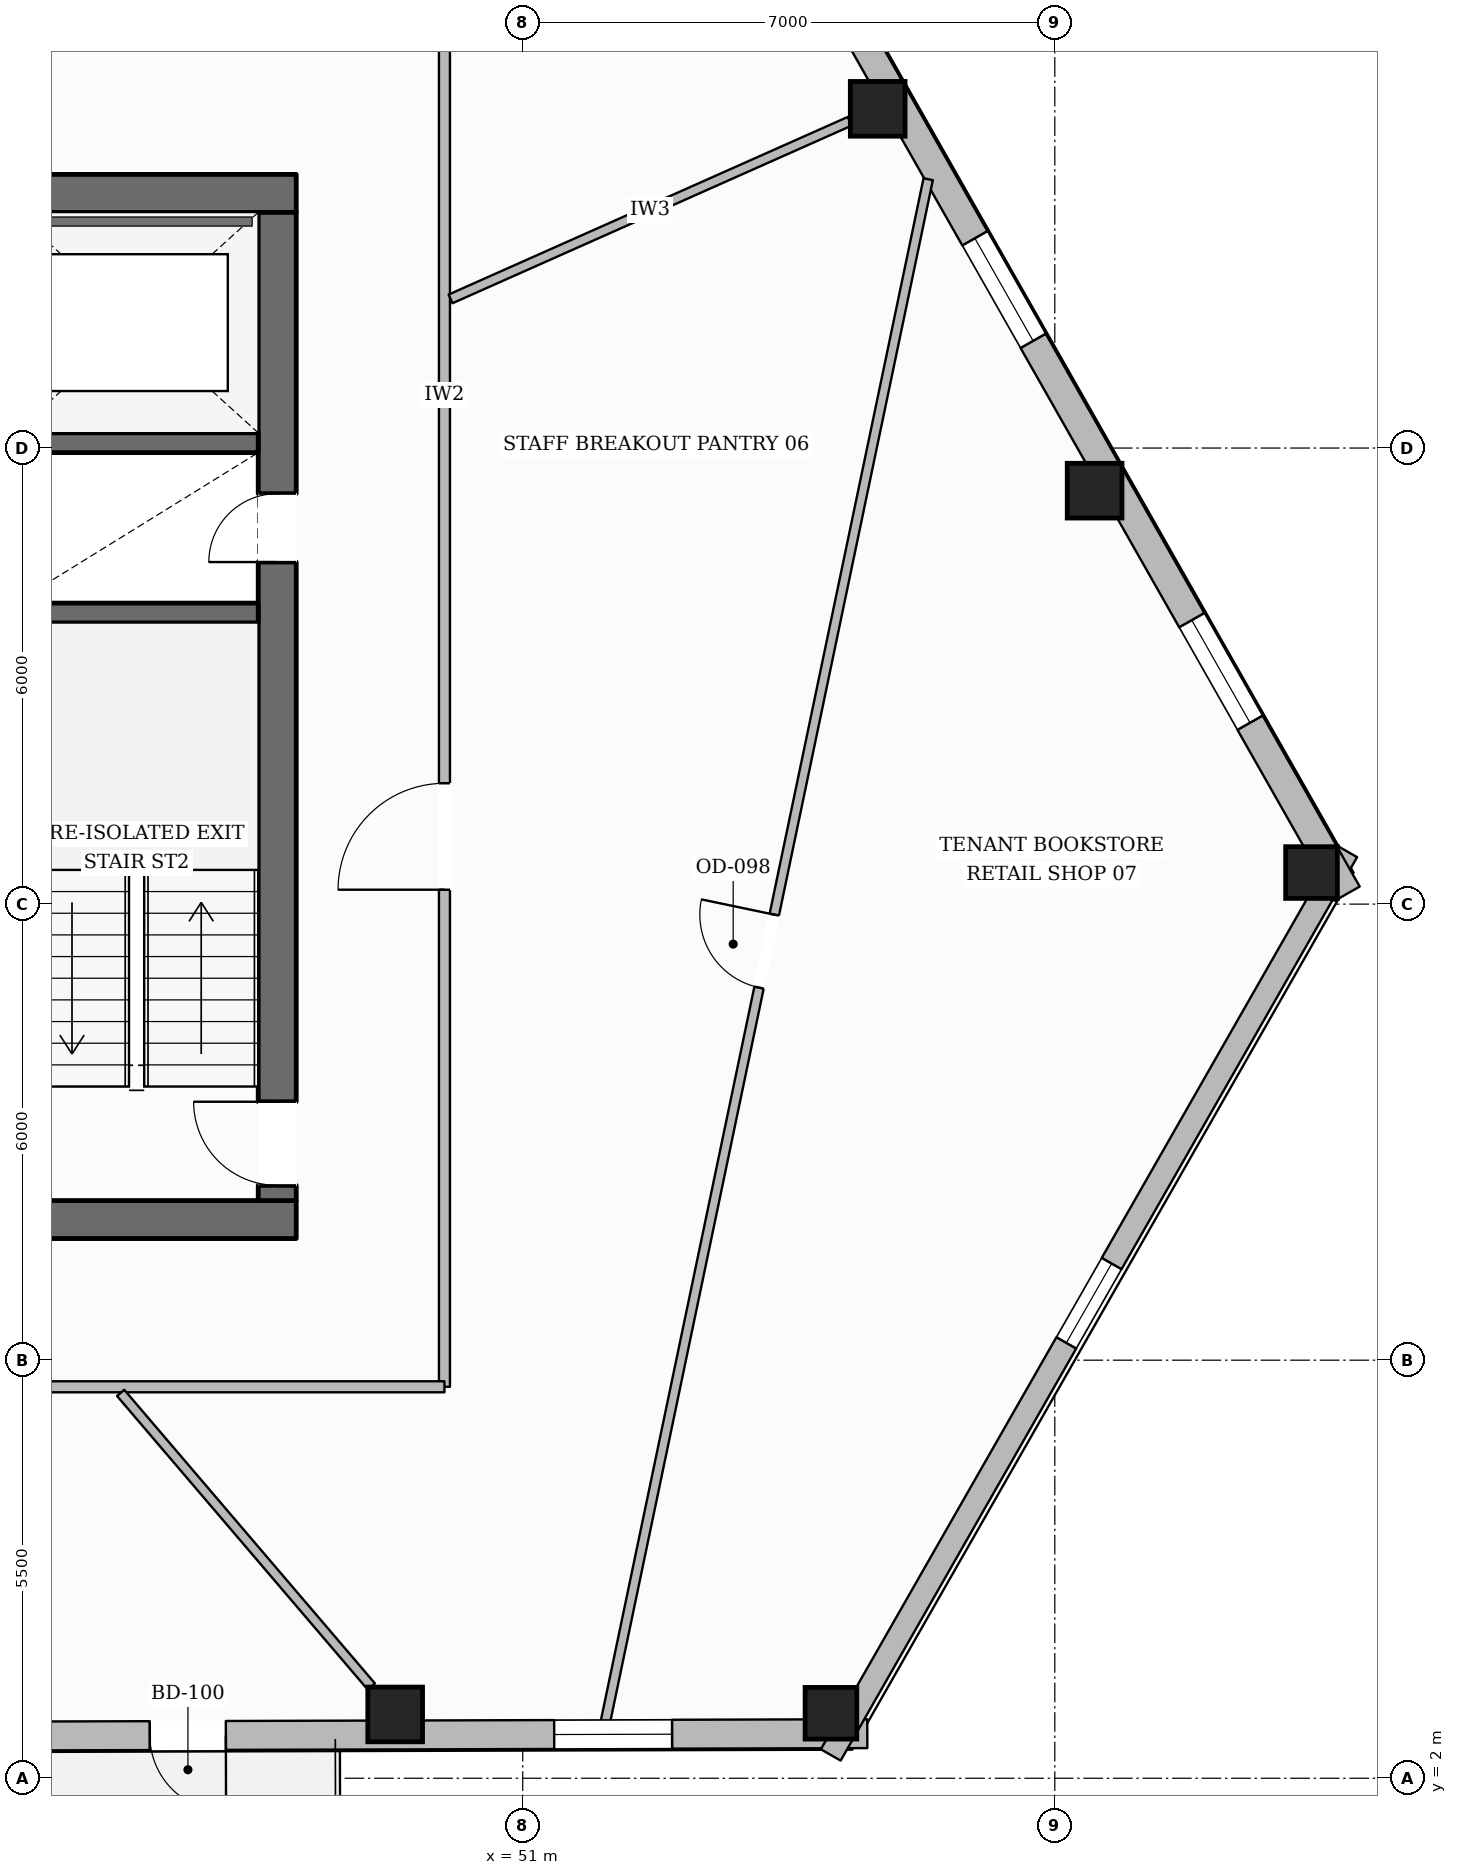
"""IFC4 building model, lengths in metres.
Left out: names, types, materials, properties, quantities, classifications, styles, units other than length and angle.
Written with IfcOpenShell. Run it as: python <this file> out.ifc"""

import sys

from ifc_helpers import new_model, si_unit, direction, frame, frame_2d, origin, origin_2d, place, context, subcontext, project, spatial, rectangle, hollow_rectangle, extrude, element, fill, save


model = new_model("IFC4")
c1 = context("Model", 3, precision=1e-05, world=origin(), true_north=direction((0.0, 1.0)))
c2 = subcontext(c1, "Body", "Model", "MODEL_VIEW")
j1 = project(units=[si_unit("LENGTHUNIT", "METRE"), si_unit("PLANEANGLEUNIT", "RADIAN")], contexts=[c1])
p1 = place(None, origin())
s1 = spatial("IfcSite", under=j1, at=p1, CompositionType="ELEMENT")
p2 = place(p1, origin())
s2 = spatial("IfcBuilding", under=s1, at=p2, CompositionType="ELEMENT")
p3 = place(p2, frame((0.0, 0.0, 89.35)))
s3 = spatial("IfcBuildingStorey", under=s2, at=p3, CompositionType="ELEMENT", Elevation=89.35)
p4 = place(p3, frame((27.98, 9.35, 0.0), z_axis=(0.0, 0.0, 1.0), x_axis=(1.0, 0.0, 0.0)))
e1 = element("IfcWall", 1, at=p4, inside=s3, PredefinedType="SOLIDWALL", context=c2, shape_type="SweptSolid", body=[
    extrude(rectangle(XDim=20.04, YDim=0.5, at=frame_2d((10.02, 0.0))), origin(), (0.0, 0.0, 1.0), 3.6),
])
p5 = place(p4, frame((10.52, 0.0, 0.0)))
e2 = element("IfcOpeningElement", 2, at=p5, cuts=e1, PredefinedType="OPENING", context=c2, shape_type="SweptSolid", body=[
    extrude(rectangle(XDim=1.4, YDim=2.2, at=frame_2d((0.7, 1.1))), frame((0.0, 0.26, 0.0), z_axis=(0.0, -1.0, 0.0), x_axis=(1.0, 0.0, 0.0)), (0.0, 0.0, 1.0), 0.52),
])
p6 = place(p3, frame((27.98, 22.85, 0.0), z_axis=(0.0, 0.0, 1.0), x_axis=(1.0, 0.0, 0.0)))
e3 = element("IfcWall", 3, at=p6, inside=s3, PredefinedType="SOLIDWALL", context=c2, shape_type="SweptSolid", body=[
    extrude(rectangle(XDim=20.04, YDim=0.5, at=frame_2d((10.02, 0.0))), origin(), (0.0, 0.0, 1.0), 3.6),
])
p7 = place(p6, frame((6.295, 0.0, 0.0)))
e4 = element("IfcOpeningElement", 4, at=p7, cuts=e3, PredefinedType="OPENING", context=c2, shape_type="SweptSolid", body=[
    extrude(rectangle(XDim=1.05, YDim=2.15, at=frame_2d((0.525, 1.075))), frame((0.0, 0.26, 0.0), z_axis=(0.0, -1.0, 0.0), x_axis=(1.0, 0.0, 0.0)), (0.0, 0.0, 1.0), 0.52),
])
p8 = place(p6, frame((12.695, 0.0, 0.0)))
e5 = element("IfcOpeningElement", 5, at=p8, cuts=e3, PredefinedType="OPENING", context=c2, shape_type="SweptSolid", body=[
    extrude(rectangle(XDim=1.05, YDim=2.15, at=frame_2d((0.525, 1.075))), frame((0.0, 0.26, 0.0), z_axis=(0.0, -1.0, 0.0), x_axis=(1.0, 0.0, 0.0)), (0.0, 0.0, 1.0), 0.52),
])
p9 = place(p3, frame((47.77, 9.6, 0.0), z_axis=(0.0, 0.0, 1.0), x_axis=(0.0, 1.0, 0.0)))
e6 = element("IfcWall", 6, at=p9, inside=s3, PredefinedType="SOLIDWALL", context=c2, shape_type="SweptSolid", body=[
    extrude(rectangle(XDim=13.0, YDim=0.5, at=frame_2d((6.5, 0.0))), origin(), (0.0, 0.0, 1.0), 3.6),
])
p10 = place(p9, frame((0.2, 0.0, 0.0)))
e7 = element("IfcOpeningElement", 7, at=p10, cuts=e6, PredefinedType="OPENING", context=c2, shape_type="SweptSolid", body=[
    extrude(rectangle(XDim=1.1, YDim=2.15, at=frame_2d((0.55, 1.075))), frame((0.0, 0.26, 0.0), z_axis=(0.0, -1.0, 0.0), x_axis=(1.0, 0.0, 0.0)), (0.0, 0.0, 1.0), 0.52),
])
p11 = place(p9, frame((8.4, 0.0, 0.0)))
e8 = element("IfcOpeningElement", 8, at=p11, cuts=e6, PredefinedType="OPENING", context=c2, shape_type="SweptSolid", body=[
    extrude(rectangle(XDim=0.9, YDim=2.1, at=frame_2d((0.45, 1.05))), frame((0.0, 0.26, 0.0), z_axis=(0.0, -1.0, 0.0), x_axis=(1.0, 0.0, 0.0)), (0.0, 0.0, 1.0), 0.52),
])
for number, where, z_axis, x_axis in (
    (9, (44.32, 17.33, 0.0), (0.0, 0.0, 1.0), (1.0, 0.0, 0.0)),
    (10, (44.32, 19.57, 0.0), (0.0, 0.0, 1.0), (1.0, 0.0, 0.0)),
):
    element("IfcWall", number, at=place(p3, frame(where, z_axis=z_axis, x_axis=x_axis)), inside=s3, PredefinedType="SHEAR", context=c2, shape_type="SweptSolid", body=[
        extrude(rectangle(XDim=3.2, YDim=0.26, at=frame_2d((1.6, 0.0))), origin(), (0.0, 0.0, 1.0), 3.6),
    ])
p12 = place(p3, frame((49.322, 2.839, 0.0), z_axis=(0.0, 0.0, 1.0), x_axis=(1.0, 0.0, 0.0)))
e11 = element("IfcColumn", 11, at=p12, inside=s3, PredefinedType="COLUMN", context=c2, shape_type="SweptSolid", body=[
    extrude(hollow_rectangle(XDim=0.72, YDim=0.72, WallThickness=0.032, at=origin_2d()), origin(), (0.0, 0.0, 1.0), 3.6),
])
for number, where, z_axis, x_axis in (
    (12, (55.055, 2.855, 0.0), (0.0, 0.0, 1.0), (1.0, 0.0, 0.0)),
    (13, (61.377, 13.915, 0.0), (0.0, 0.0, 1.0), (1.0, 0.0, 0.0)),
):
    element("IfcColumn", number, at=place(p3, frame(where, z_axis=z_axis, x_axis=x_axis)), inside=s3, PredefinedType="COLUMN", context=c2, shape_type="SweptSolid", body=[
        extrude(hollow_rectangle(XDim=0.68, YDim=0.68, WallThickness=0.03, at=origin_2d()), origin(), (0.0, 0.0, 1.0), 3.6),
    ])
for number, where, z_axis, x_axis in (
    (14, (58.524, 18.939, 0.0), (0.0, 0.0, 1.0), (1.0, 0.0, 0.0)),
    (15, (55.67, 23.963, 0.0), (0.0, 0.0, 1.0), (1.0, 0.0, 0.0)),
):
    element("IfcColumn", number, at=place(p3, frame(where, z_axis=z_axis, x_axis=x_axis)), inside=s3, PredefinedType="COLUMN", context=c2, shape_type="SweptSolid", body=[
        extrude(hollow_rectangle(XDim=0.72, YDim=0.72, WallThickness=0.032, at=origin_2d()), origin(), (0.0, 0.0, 1.0), 3.6),
    ])
p13 = place(p3, frame((55.533, 2.586, 0.0), z_axis=(0.0, 0.0, 1.0), x_axis=(-0.999996299189, -0.002720589845, 0.0)))
e16 = element("IfcWall", 16, at=p13, inside=s3, PredefinedType="STANDARD", context=c2, shape_type="SweptSolid", body=[
    extrude(rectangle(XDim=35.357, YDim=0.38, at=frame_2d((17.678, 0.0))), origin(), (0.0, 0.0, 1.0), 3.059),
])
p14 = place(p13, frame((8.439, 0.0, 0.0)))
e17 = element("IfcOpeningElement", 17, at=p14, cuts=e16, PredefinedType="OPENING", context=c2, shape_type="SweptSolid", body=[
    extrude(rectangle(XDim=1.0, YDim=2.2, at=frame_2d((0.5, 1.1))), frame((0.0, 0.2, 0.0), z_axis=(0.0, -1.0, 0.0), x_axis=(1.0, 0.0, 0.0)), (0.0, 0.0, 1.0), 0.4),
])
p15 = place(p13, frame((31.235, 0.0, 0.65)))
e18 = element("IfcOpeningElement", 18, at=p15, cuts=e16, PredefinedType="OPENING", context=c2, shape_type="SweptSolid", body=[
    extrude(rectangle(XDim=1.55, YDim=1.75, at=frame_2d((0.775, 0.875))), frame((0.0, 0.2, 0.0), z_axis=(0.0, -1.0, 0.0), x_axis=(1.0, 0.0, 0.0)), (0.0, 0.0, 1.0), 0.4),
])
p16 = place(p13, frame((25.502, 0.0, 0.65)))
e19 = element("IfcOpeningElement", 19, at=p16, cuts=e16, PredefinedType="OPENING", context=c2, shape_type="SweptSolid", body=[
    extrude(rectangle(XDim=1.55, YDim=1.75, at=frame_2d((0.775, 0.875))), frame((0.0, 0.2, 0.0), z_axis=(0.0, -1.0, 0.0), x_axis=(1.0, 0.0, 0.0)), (0.0, 0.0, 1.0), 0.4),
])
p17 = place(p13, frame((19.769, 0.0, 0.65)))
e20 = element("IfcOpeningElement", 20, at=p17, cuts=e16, PredefinedType="OPENING", context=c2, shape_type="SweptSolid", body=[
    extrude(rectangle(XDim=1.55, YDim=1.75, at=frame_2d((0.775, 0.875))), frame((0.0, 0.2, 0.0), z_axis=(0.0, -1.0, 0.0), x_axis=(1.0, 0.0, 0.0)), (0.0, 0.0, 1.0), 0.4),
])
p18 = place(p13, frame((2.569, 0.0, 0.65)))
e21 = element("IfcOpeningElement", 21, at=p18, cuts=e16, PredefinedType="OPENING", context=c2, shape_type="SweptSolid", body=[
    extrude(rectangle(XDim=1.55, YDim=1.75, at=frame_2d((0.775, 0.875))), frame((0.0, 0.2, 0.0), z_axis=(0.0, -1.0, 0.0), x_axis=(1.0, 0.0, 0.0)), (0.0, 0.0, 1.0), 0.4),
])
p19 = place(p3, frame((61.847, 14.192, 0.0), z_axis=(0.0, 0.0, 1.0), x_axis=(-0.49627336064, -0.868166315586, 0.0)))
e22 = element("IfcWall", 22, at=p19, inside=s3, PredefinedType="STANDARD", context=c2, shape_type="SweptSolid", body=[
    extrude(rectangle(XDim=13.691, YDim=0.3, at=frame_2d((6.845, 0.0))), origin(), (0.0, 0.0, 1.0), 3.059),
])
p20 = place(p19, frame((6.246, 0.0, 0.65)))
e23 = element("IfcOpeningElement", 23, at=p20, cuts=e22, PredefinedType="OPENING", context=c2, shape_type="SweptSolid", body=[
    extrude(rectangle(XDim=1.2, YDim=1.7, at=frame_2d((0.6, 0.85))), frame((0.0, 0.16, 0.0), z_axis=(0.0, -1.0, 0.0), x_axis=(1.0, 0.0, 0.0)), (0.0, 0.0, 1.0), 0.32),
])
p21 = place(p3, frame((44.253, 44.609, 0.0), z_axis=(0.0, 0.0, 1.0), x_axis=(0.493917790196, -0.869508606356, 0.0)))
e24 = element("IfcWall", 24, at=p21, inside=s3, PredefinedType="STANDARD", context=c2, shape_type="SweptSolid", body=[
    extrude(rectangle(XDim=35.62, YDim=0.38, at=frame_2d((17.81, 0.0))), origin(), (0.0, 0.0, 1.0), 3.059),
])
p22 = place(p21, frame((8.505, 0.0, 0.0)))
e25 = element("IfcOpeningElement", 25, at=p22, cuts=e24, PredefinedType="OPENING", context=c2, shape_type="SweptSolid", body=[
    extrude(rectangle(XDim=1.0, YDim=2.2, at=frame_2d((0.5, 1.1))), frame((0.0, 0.2, 0.0), z_axis=(0.0, -1.0, 0.0), x_axis=(1.0, 0.0, 0.0)), (0.0, 0.0, 1.0), 0.4),
])
p23 = place(p21, frame((31.483, 0.0, 0.65)))
e26 = element("IfcOpeningElement", 26, at=p23, cuts=e24, PredefinedType="OPENING", context=c2, shape_type="SweptSolid", body=[
    extrude(rectangle(XDim=1.55, YDim=1.75, at=frame_2d((0.775, 0.875))), frame((0.0, 0.2, 0.0), z_axis=(0.0, -1.0, 0.0), x_axis=(1.0, 0.0, 0.0)), (0.0, 0.0, 1.0), 0.4),
])
p24 = place(p21, frame((25.705, 0.0, 0.65)))
e27 = element("IfcOpeningElement", 27, at=p24, cuts=e24, PredefinedType="OPENING", context=c2, shape_type="SweptSolid", body=[
    extrude(rectangle(XDim=1.55, YDim=1.75, at=frame_2d((0.775, 0.875))), frame((0.0, 0.2, 0.0), z_axis=(0.0, -1.0, 0.0), x_axis=(1.0, 0.0, 0.0)), (0.0, 0.0, 1.0), 0.4),
])
p25 = place(p21, frame((19.927, 0.0, 0.65)))
e28 = element("IfcOpeningElement", 28, at=p25, cuts=e24, PredefinedType="OPENING", context=c2, shape_type="SweptSolid", body=[
    extrude(rectangle(XDim=1.55, YDim=1.75, at=frame_2d((0.775, 0.875))), frame((0.0, 0.2, 0.0), z_axis=(0.0, -1.0, 0.0), x_axis=(1.0, 0.0, 0.0)), (0.0, 0.0, 1.0), 0.4),
])
p26 = place(p21, frame((2.594, 0.0, 0.65)))
e29 = element("IfcOpeningElement", 29, at=p26, cuts=e24, PredefinedType="OPENING", context=c2, shape_type="SweptSolid", body=[
    extrude(rectangle(XDim=1.55, YDim=1.75, at=frame_2d((0.775, 0.875))), frame((0.0, 0.2, 0.0), z_axis=(0.0, -1.0, 0.0), x_axis=(1.0, 0.0, 0.0)), (0.0, 0.0, 1.0), 0.4),
])
p27 = place(p3, frame((49.97, 7.15, 0.0), z_axis=(0.0, 0.0, 1.0), x_axis=(0.0, 1.0, 0.0)))
e30 = element("IfcWall", 30, at=p27, inside=s3, PredefinedType="PARTITIONING", context=c2, shape_type="SweptSolid", body=[
    extrude(rectangle(XDim=17.9, YDim=0.145, at=frame_2d((8.95, 0.0))), origin(), (0.0, 0.0, 1.0), 3.288),
])
p28 = place(p27, frame((6.54, 0.0, 0.0)))
e31 = element("IfcOpeningElement", 31, at=p28, cuts=e30, PredefinedType="OPENING", context=c2, shape_type="SweptSolid", body=[
    extrude(rectangle(XDim=1.4, YDim=2.2, at=frame_2d((0.7, 1.1))), frame((0.0, 0.083, 0.0), z_axis=(0.0, -1.0, 0.0), x_axis=(1.0, 0.0, 0.0)), (0.0, 0.0, 1.0), 0.165),
])
p29 = place(p3, frame((26.03, 7.15, 0.0), z_axis=(0.0, 0.0, 1.0), x_axis=(1.0, 0.0, 0.0)))
e32 = element("IfcWall", 32, at=p29, inside=s3, PredefinedType="PARTITIONING", context=c2, shape_type="SweptSolid", body=[
    extrude(rectangle(XDim=23.94, YDim=0.145, at=frame_2d((11.97, 0.0))), origin(), (0.0, 0.0, 1.0), 3.6),
])
p30 = place(p29, frame((4.53, 0.0, 0.0)))
e33 = element("IfcOpeningElement", 33, at=p30, cuts=e32, PredefinedType="OPENING", context=c2, shape_type="SweptSolid", body=[
    extrude(rectangle(XDim=0.88, YDim=2.1, at=frame_2d((0.44, 1.05))), frame((0.0, 0.083, 0.0), z_axis=(0.0, -1.0, 0.0), x_axis=(1.0, 0.0, 0.0)), (0.0, 0.0, 1.0), 0.165),
])
p31 = place(p29, frame((7.05, 0.0, 0.0)))
e34 = element("IfcOpeningElement", 34, at=p31, cuts=e32, PredefinedType="OPENING", context=c2, shape_type="SweptSolid", body=[
    extrude(rectangle(XDim=0.88, YDim=2.1, at=frame_2d((0.44, 1.05))), frame((0.0, 0.083, 0.0), z_axis=(0.0, -1.0, 0.0), x_axis=(1.0, 0.0, 0.0)), (0.0, 0.0, 1.0), 0.165),
])
p32 = place(p29, frame((9.43, 0.0, 0.0)))
e35 = element("IfcOpeningElement", 35, at=p32, cuts=e32, PredefinedType="OPENING", context=c2, shape_type="SweptSolid", body=[
    extrude(rectangle(XDim=0.96, YDim=2.1, at=frame_2d((0.48, 1.05))), frame((0.0, 0.083, 0.0), z_axis=(0.0, -1.0, 0.0), x_axis=(1.0, 0.0, 0.0)), (0.0, 0.0, 1.0), 0.165),
])
p33 = place(p29, frame((14.632, 0.0, 0.0)))
e36 = element("IfcOpeningElement", 36, at=p33, cuts=e32, PredefinedType="OPENING", context=c2, shape_type="SweptSolid", body=[
    extrude(rectangle(XDim=1.4, YDim=2.2, at=frame_2d((0.7, 1.1))), frame((0.0, 0.083, 0.0), z_axis=(0.0, -1.0, 0.0), x_axis=(1.0, 0.0, 0.0)), (0.0, 0.0, 1.0), 0.165),
])
p34 = place(p3, frame((50.051, 21.462, 0.0), z_axis=(0.0, 0.0, 1.0), x_axis=(0.913638062083, 0.406528586341, 0.0)))
e37 = element("IfcWall", 37, at=p34, inside=s3, PredefinedType="PARTITIONING", context=c2, shape_type="SweptSolid", body=[
    extrude(rectangle(XDim=5.748, YDim=0.125, at=frame_2d((2.874, 0.0))), origin(), (0.0, 0.0, 1.0), 3.141),
])
p35 = place(p3, frame((45.71, 7.07, 0.0), z_axis=(0.0, 0.0, 1.0), x_axis=(0.649317320113, -0.760517598613, 0.0)))
e38 = element("IfcWall", 38, at=p35, inside=s3, PredefinedType="PARTITIONING", context=c2, shape_type="SweptSolid", body=[
    extrude(rectangle(XDim=5.078, YDim=0.125, at=frame_2d((2.539, 0.0))), origin(), (0.0, 0.0, 1.0), 3.6),
])
p36 = place(p3, frame((52.084, 2.727, 0.0), z_axis=(0.0, 0.0, 1.0), x_axis=(0.204797093971, 0.978804449469, 0.0)))
e39 = element("IfcWall", 39, at=p36, inside=s3, PredefinedType="PARTITIONING", context=c2, shape_type="SweptSolid", body=[
    extrude(rectangle(XDim=20.75, YDim=0.125, at=frame_2d((10.375, 0.0))), origin(), (0.0, 0.0, 1.0), 3.288),
])
p37 = place(p36, frame((9.885, 0.0, 0.0)))
e40 = element("IfcOpeningElement", 40, at=p37, cuts=e39, PredefinedType="OPENING", context=c2, shape_type="SweptSolid", body=[
    extrude(rectangle(XDim=0.98, YDim=2.15, at=frame_2d((0.49, 1.075))), frame((0.0, 0.073, 0.0), z_axis=(0.0, -1.0, 0.0), x_axis=(1.0, 0.0, 0.0)), (0.0, 0.0, 1.0), 0.145),
])
p38 = place(p14, origin())
e41 = element("IfcDoor", 41, at=p38, inside=s3, OperationType="SINGLE_SWING_LEFT", PredefinedType="DOOR", context=c2, shape_type="SweptSolid", body=[
    extrude(rectangle(XDim=1.0, YDim=2.2, at=frame_2d((0.5, 1.1))), frame((0.0, 0.025, 0.0), z_axis=(0.0, -1.0, 0.0), x_axis=(1.0, 0.0, 0.0)), (0.0, 0.0, 1.0), 0.05),
])
fill(e17, e41)
p39 = place(p18, origin())
e42 = element("IfcWindow", 42, at=p39, inside=s3, PartitioningType="SINGLE_PANEL", PredefinedType="WINDOW", context=c2, shape_type="SweptSolid", body=[
    extrude(rectangle(XDim=1.55, YDim=1.75, at=frame_2d((0.775, 0.875))), frame((0.0, 0.03, 0.0), z_axis=(0.0, -1.0, 0.0), x_axis=(1.0, 0.0, 0.0)), (0.0, 0.0, 1.0), 0.06),
])
fill(e21, e42)
p40 = place(p23, origin())
e43 = element("IfcWindow", 43, at=p40, inside=s3, PartitioningType="SINGLE_PANEL", PredefinedType="WINDOW", context=c2, shape_type="SweptSolid", body=[
    extrude(rectangle(XDim=1.55, YDim=1.75, at=frame_2d((0.775, 0.875))), frame((0.0, 0.03, 0.0), z_axis=(0.0, -1.0, 0.0), x_axis=(1.0, 0.0, 0.0)), (0.0, 0.0, 1.0), 0.06),
])
fill(e26, e43)
p41 = place(p24, origin())
e44 = element("IfcWindow", 44, at=p41, inside=s3, PartitioningType="SINGLE_PANEL", PredefinedType="WINDOW", context=c2, shape_type="SweptSolid", body=[
    extrude(rectangle(XDim=1.55, YDim=1.75, at=frame_2d((0.775, 0.875))), frame((0.0, 0.03, 0.0), z_axis=(0.0, -1.0, 0.0), x_axis=(1.0, 0.0, 0.0)), (0.0, 0.0, 1.0), 0.06),
])
fill(e27, e44)
p42 = place(p20, origin())
e45 = element("IfcWindow", 45, at=p42, inside=s3, PartitioningType="SINGLE_PANEL", PredefinedType="WINDOW", context=c2, shape_type="SweptSolid", body=[
    extrude(rectangle(XDim=1.2, YDim=1.7, at=frame_2d((0.6, 0.85))), frame((0.0, 0.03, 0.0), z_axis=(0.0, -1.0, 0.0), x_axis=(1.0, 0.0, 0.0)), (0.0, 0.0, 1.0), 0.06),
])
fill(e23, e45)
p43 = place(p10, origin())
e46 = element("IfcDoor", 46, at=p43, inside=s3, OperationType="SINGLE_SWING_RIGHT", PredefinedType="DOOR", context=c2, shape_type="SweptSolid", body=[
    extrude(rectangle(XDim=1.1, YDim=2.15, at=frame_2d((0.55, 1.075))), frame((0.0, 0.025, 0.0), z_axis=(0.0, -1.0, 0.0), x_axis=(1.0, 0.0, 0.0)), (0.0, 0.0, 1.0), 0.05),
])
fill(e7, e46)
p44 = place(p11, origin())
e47 = element("IfcDoor", 47, at=p44, inside=s3, OperationType="SINGLE_SWING_LEFT", PredefinedType="DOOR", context=c2, shape_type="SweptSolid", body=[
    extrude(rectangle(XDim=0.9, YDim=2.1, at=frame_2d((0.45, 1.05))), frame((0.0, 0.025, 0.0), z_axis=(0.0, -1.0, 0.0), x_axis=(1.0, 0.0, 0.0)), (0.0, 0.0, 1.0), 0.05),
])
fill(e8, e47)
p45 = place(p28, origin())
e48 = element("IfcDoor", 48, at=p45, inside=s3, OperationType="SINGLE_SWING_LEFT", PredefinedType="DOOR", context=c2, shape_type="SweptSolid", body=[
    extrude(rectangle(XDim=1.4, YDim=2.2, at=frame_2d((0.7, 1.1))), frame((0.0, 0.025, 0.0), z_axis=(0.0, -1.0, 0.0), x_axis=(1.0, 0.0, 0.0)), (0.0, 0.0, 1.0), 0.05),
])
fill(e31, e48)
p46 = place(p37, origin())
e49 = element("IfcDoor", 49, at=p46, inside=s3, OperationType="SINGLE_SWING_RIGHT", PredefinedType="DOOR", context=c2, shape_type="SweptSolid", body=[
    extrude(rectangle(XDim=0.98, YDim=2.15, at=frame_2d((0.49, 1.075))), frame((0.0, 0.025, 0.0), z_axis=(0.0, -1.0, 0.0), x_axis=(1.0, 0.0, 0.0)), (0.0, 0.0, 1.0), 0.05),
])
fill(e40, e49)
save(model, sys.argv[1])
